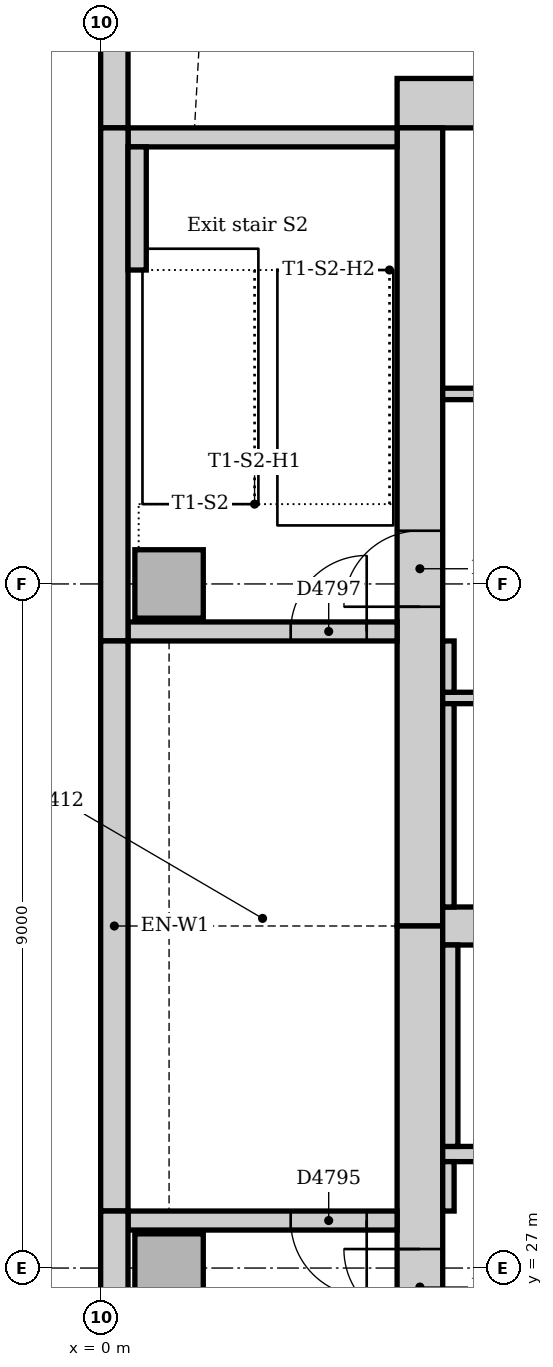
"""IFC4 building model, lengths in metres.
Left out: names, types, materials, properties, quantities, classifications, styles, units other than length and angle.
Written with IfcOpenShell. Run it as: python <this file> out.ifc"""

import sys

from ifc_helpers import new_model, si_unit, direction, frame, frame_2d, origin, origin_2d, place, context, subcontext, project, spatial, rectangle, extrude, element, fill, save


model = new_model("IFC4")
c1 = context("Model", 3, precision=1e-05, world=origin(), true_north=direction((0.0, 1.0)))
c2 = subcontext(c1, "Body", "Model", "MODEL_VIEW")
j1 = project(units=[si_unit("LENGTHUNIT", "METRE"), si_unit("PLANEANGLEUNIT", "RADIAN")], contexts=[c1])
p1 = place(None, origin())
s1 = spatial("IfcSite", under=j1, at=p1, CompositionType="ELEMENT")
p2 = place(p1, origin())
s2 = spatial("IfcBuilding", under=s1, at=p2, CompositionType="ELEMENT")
p3 = place(p2, frame((0.0, 0.0, 185.0)))
s3 = spatial("IfcBuildingStorey", under=s2, at=p3, CompositionType="ELEMENT", Elevation=185.0)
p4 = place(p3, frame((23.15, 42.325, 0.0), z_axis=(0.0, 0.0, 1.0), x_axis=(-1.0, 0.0, 0.0)))
e1 = element("IfcWall", 1, at=p4, inside=s3, PredefinedType="SOLIDWALL", context=c2, shape_type="SweptSolid", body=[
    extrude(rectangle(XDim=19.25, YDim=0.65, at=frame_2d((9.625, 0.0))), origin(), (0.0, 0.0, 1.0), 4.0),
])
p5 = place(p3, frame((4.2, 42.0, 0.0), z_axis=(0.0, 0.0, 1.0), x_axis=(0.0, -1.0, 0.0)))
e2 = element("IfcWall", 2, at=p5, inside=s3, PredefinedType="SOLIDWALL", context=c2, shape_type="SweptSolid", body=[
    extrude(rectangle(XDim=10.5, YDim=0.6, at=frame_2d((5.25, 0.0))), origin(), (0.0, 0.0, 1.0), 4.0),
])
p6 = place(p5, frame((5.3, 0.0, 0.0)))
e3 = element("IfcOpeningElement", 3, at=p6, cuts=e2, PredefinedType="OPENING", context=c2, shape_type="SweptSolid", body=[
    extrude(rectangle(XDim=1.0, YDim=2.1, at=frame_2d((0.5, 1.05))), frame((0.0, 0.31, 0.0), z_axis=(0.0, -1.0, 0.0), x_axis=(1.0, 0.0, 0.0)), (0.0, 0.0, 1.0), 0.62),
])
p7 = place(p3, frame((4.2, 31.5, 0.0), z_axis=(0.0, 0.0, 1.0), x_axis=(0.0, -1.0, 0.0)))
e4 = element("IfcWall", 4, at=p7, inside=s3, PredefinedType="SOLIDWALL", context=c2, shape_type="SweptSolid", body=[
    extrude(rectangle(XDim=10.5, YDim=0.6, at=frame_2d((5.25, 0.0))), origin(), (0.0, 0.0, 1.0), 4.0),
])
p8 = place(p7, frame((4.25, 0.0, 0.0)))
e5 = element("IfcOpeningElement", 5, at=p8, cuts=e4, PredefinedType="OPENING", context=c2, shape_type="SweptSolid", body=[
    extrude(rectangle(XDim=1.0, YDim=2.1, at=frame_2d((0.5, 1.05))), frame((0.0, 0.31, 0.0), z_axis=(0.0, -1.0, 0.0), x_axis=(1.0, 0.0, 0.0)), (0.0, 0.0, 1.0), 0.62),
])
p9 = place(p3, frame((4.5, 31.5, 0.0), z_axis=(0.0, 0.0, 1.0), x_axis=(1.0, 0.0, 0.0)))
e6 = element("IfcWall", 6, at=p9, inside=s3, PredefinedType="SOLIDWALL", context=c2, shape_type="SweptSolid", body=[
    extrude(rectangle(XDim=18.0, YDim=0.5, at=frame_2d((9.0, 0.0))), origin(), (0.0, 0.0, 1.0), 4.0),
])
p10 = place(p3, frame((3.9, 27.625, 0.0), z_axis=(0.0, 0.0, 1.0), x_axis=(-1.0, 0.0, 0.0)))
e7 = element("IfcWall", 7, at=p10, inside=s3, PredefinedType="SOLIDWALL", context=c2, shape_type="SweptSolid", body=[
    extrude(rectangle(XDim=3.54, YDim=0.25, at=frame_2d((1.77, 0.0))), origin(), (0.0, 0.0, 1.0), 4.0),
])
p11 = place(p10, frame((0.4, 0.0, 0.0)))
e8 = element("IfcOpeningElement", 8, at=p11, cuts=e7, PredefinedType="OPENING", context=c2, shape_type="SweptSolid", body=[
    extrude(rectangle(XDim=1.0, YDim=2.1, at=frame_2d((0.5, 1.05))), frame((0.0, 0.135, 0.0), z_axis=(0.0, -1.0, 0.0), x_axis=(1.0, 0.0, 0.0)), (0.0, 0.0, 1.0), 0.27),
])
p12 = place(p3, frame((0.36, 35.375, 0.0), z_axis=(0.0, 0.0, 1.0), x_axis=(1.0, 0.0, 0.0)))
e9 = element("IfcWall", 9, at=p12, inside=s3, PredefinedType="SOLIDWALL", context=c2, shape_type="SweptSolid", body=[
    extrude(rectangle(XDim=3.54, YDim=0.25, at=frame_2d((1.77, 0.0))), origin(), (0.0, 0.0, 1.0), 4.0),
])
p13 = place(p12, frame((2.14, 0.0, 0.0)))
e10 = element("IfcOpeningElement", 10, at=p13, cuts=e9, PredefinedType="OPENING", context=c2, shape_type="SweptSolid", body=[
    extrude(rectangle(XDim=1.0, YDim=2.1, at=frame_2d((0.5, 1.05))), frame((0.0, 0.135, 0.0), z_axis=(0.0, -1.0, 0.0), x_axis=(1.0, 0.0, 0.0)), (0.0, 0.0, 1.0), 0.27),
])
p14 = place(p3, frame((3.9, 41.875, 0.0), z_axis=(0.0, 0.0, 1.0), x_axis=(-1.0, 0.0, 0.0)))
e11 = element("IfcWall", 11, at=p14, inside=s3, PredefinedType="SOLIDWALL", context=c2, shape_type="SweptSolid", body=[
    extrude(rectangle(XDim=3.54, YDim=0.25, at=frame_2d((1.77, 0.0))), origin(), (0.0, 0.0, 1.0), 4.0),
])
for number, where, z_axis, x_axis in (
    (12, (0.9, 27.0, 0.0), (0.0, 0.0, 1.0), (1.0, 0.0, 0.0)),
    (13, (0.9, 36.0, 0.0), (0.0, 0.0, 1.0), (1.0, 0.0, 0.0)),
):
    element("IfcColumn", number, at=place(p3, frame(where, z_axis=z_axis, x_axis=x_axis)), inside=s3, PredefinedType="COLUMN", context=c2, shape_type="SweptSolid", body=[
        extrude(rectangle(XDim=0.9, YDim=0.9, at=origin_2d()), origin(), (0.0, 0.0, 1.0), 4.0),
    ])
p15 = place(p3, frame((0.18, 49.757, 0.0), z_axis=(0.0, 0.0, 1.0), x_axis=(0.0, -1.0, 0.0)))
e14 = element("IfcWall", 14, at=p15, inside=s3, PredefinedType="STANDARD", context=c2, shape_type="SweptSolid", body=[
    extrude(rectangle(XDim=7.757, YDim=0.36, at=frame_2d((3.879, 0.0))), origin(), (0.0, 0.0, 1.0), 3.85),
])
p16 = place(p15, frame((3.107, 0.0, 0.9)))
e15 = element("IfcOpeningElement", 15, at=p16, cuts=e14, PredefinedType="OPENING", context=c2, shape_type="SweptSolid", body=[
    extrude(rectangle(XDim=3.3, YDim=1.6, at=frame_2d((1.65, 0.8))), frame((0.0, 0.19, 0.0), z_axis=(0.0, -1.0, 0.0), x_axis=(1.0, 0.0, 0.0)), (0.0, 0.0, 1.0), 0.38),
])
p17 = place(p3, frame((0.18, 42.0, 0.0), z_axis=(0.0, 0.0, 1.0), x_axis=(0.0, -1.0, 0.0)))
e16 = element("IfcWall", 16, at=p17, inside=s3, PredefinedType="STANDARD", context=c2, shape_type="SweptSolid", body=[
    extrude(rectangle(XDim=6.75, YDim=0.36, at=frame_2d((3.375, 0.0))), origin(), (0.0, 0.0, 1.0), 3.85),
])
p18 = place(p3, frame((0.18, 35.25, 0.0), z_axis=(0.0, 0.0, 1.0), x_axis=(0.0, -1.0, 0.0)))
e17 = element("IfcWall", 17, at=p18, inside=s3, PredefinedType="STANDARD", context=c2, shape_type="SweptSolid", body=[
    extrude(rectangle(XDim=7.5, YDim=0.36, at=frame_2d((3.75, 0.0))), origin(), (0.0, 0.0, 1.0), 3.85),
])
p19 = place(p3, frame((0.18, 27.75, 0.0), z_axis=(0.0, 0.0, 1.0), x_axis=(0.0, -1.0, 0.0)))
e18 = element("IfcWall", 18, at=p19, inside=s3, PredefinedType="STANDARD", context=c2, shape_type="SweptSolid", body=[
    extrude(rectangle(XDim=6.75, YDim=0.36, at=frame_2d((3.375, 0.0))), origin(), (0.0, 0.0, 1.0), 3.85),
])
p20 = place(p3, frame((0.48, 40.13, 0.0), z_axis=(0.0, 0.0, 1.0), x_axis=(0.0, 1.0, 0.0)))
e19 = element("IfcWall", 19, at=p20, inside=s3, PredefinedType="STANDARD", context=c2, shape_type="SweptSolid", body=[
    extrude(rectangle(XDim=1.62, YDim=0.24, at=frame_2d((0.81, 0.0))), origin(), (0.0, 0.0, 1.0), 4.0),
])
p21 = place(p3, frame((4.5, 28.5, 0.0), z_axis=(0.0, 0.0, 1.0), x_axis=(1.0, 0.0, 0.0)))
e20 = element("IfcWall", 20, at=p21, inside=s3, PredefinedType="PARTITIONING", context=c2, shape_type="SweptSolid", body=[
    extrude(rectangle(XDim=18.0, YDim=0.2, at=frame_2d((9.0, 0.0))), origin(), (0.0, 0.0, 1.0), 3.85),
])
p22 = place(p21, frame((0.95, 0.0, 0.0)))
e21 = element("IfcOpeningElement", 21, at=p22, cuts=e20, PredefinedType="OPENING", context=c2, shape_type="SweptSolid", body=[
    extrude(rectangle(XDim=1.1, YDim=2.1, at=frame_2d((0.55, 1.05))), frame((0.0, 0.11, 0.0), z_axis=(0.0, -1.0, 0.0), x_axis=(1.0, 0.0, 0.0)), (0.0, 0.0, 1.0), 0.22),
])
p23 = place(p21, frame((3.95, 0.0, 0.0)))
e22 = element("IfcOpeningElement", 22, at=p23, cuts=e20, PredefinedType="OPENING", context=c2, shape_type="SweptSolid", body=[
    extrude(rectangle(XDim=1.1, YDim=2.1, at=frame_2d((0.55, 1.05))), frame((0.0, 0.11, 0.0), z_axis=(0.0, -1.0, 0.0), x_axis=(1.0, 0.0, 0.0)), (0.0, 0.0, 1.0), 0.22),
])
p24 = place(p21, frame((6.95, 0.0, 0.0)))
e23 = element("IfcOpeningElement", 23, at=p24, cuts=e20, PredefinedType="OPENING", context=c2, shape_type="SweptSolid", body=[
    extrude(rectangle(XDim=1.1, YDim=2.1, at=frame_2d((0.55, 1.05))), frame((0.0, 0.11, 0.0), z_axis=(0.0, -1.0, 0.0), x_axis=(1.0, 0.0, 0.0)), (0.0, 0.0, 1.0), 0.22),
])
p25 = place(p21, frame((9.95, 0.0, 0.0)))
e24 = element("IfcOpeningElement", 24, at=p25, cuts=e20, PredefinedType="OPENING", context=c2, shape_type="SweptSolid", body=[
    extrude(rectangle(XDim=1.1, YDim=2.1, at=frame_2d((0.55, 1.05))), frame((0.0, 0.11, 0.0), z_axis=(0.0, -1.0, 0.0), x_axis=(1.0, 0.0, 0.0)), (0.0, 0.0, 1.0), 0.22),
])
p26 = place(p21, frame((12.95, 0.0, 0.0)))
e25 = element("IfcOpeningElement", 25, at=p26, cuts=e20, PredefinedType="OPENING", context=c2, shape_type="SweptSolid", body=[
    extrude(rectangle(XDim=1.1, YDim=2.1, at=frame_2d((0.55, 1.05))), frame((0.0, 0.11, 0.0), z_axis=(0.0, -1.0, 0.0), x_axis=(1.0, 0.0, 0.0)), (0.0, 0.0, 1.0), 0.22),
])
p27 = place(p21, frame((15.95, 0.0, 0.0)))
e26 = element("IfcOpeningElement", 26, at=p27, cuts=e20, PredefinedType="OPENING", context=c2, shape_type="SweptSolid", body=[
    extrude(rectangle(XDim=1.1, YDim=2.1, at=frame_2d((0.55, 1.05))), frame((0.0, 0.11, 0.0), z_axis=(0.0, -1.0, 0.0), x_axis=(1.0, 0.0, 0.0)), (0.0, 0.0, 1.0), 0.22),
])
p28 = place(p3, frame((4.6, 28.6, 0.0), z_axis=(0.0, 0.0, 1.0), x_axis=(0.0, 1.0, 0.0)))
e27 = element("IfcWall", 27, at=p28, inside=s3, PredefinedType="PARTITIONING", context=c2, shape_type="SweptSolid", body=[
    extrude(rectangle(XDim=2.65, YDim=0.2, at=frame_2d((1.325, 0.0))), origin(), (0.0, 0.0, 1.0), 3.85),
])
p29 = place(p3, frame((4.5, 38.5, 0.0), z_axis=(0.0, 0.0, 1.0), x_axis=(1.0, 0.0, 0.0)))
e28 = element("IfcWall", 28, at=p29, inside=s3, PredefinedType="PARTITIONING", context=c2, shape_type="SweptSolid", body=[
    extrude(rectangle(XDim=11.9, YDim=0.15, at=frame_2d((5.95, 0.0))), origin(), (0.0, 0.0, 1.0), 3.85),
])
p30 = place(p29, frame((1.1, 0.0, 0.0)))
e29 = element("IfcOpeningElement", 29, at=p30, cuts=e28, PredefinedType="OPENING", context=c2, shape_type="SweptSolid", body=[
    extrude(rectangle(XDim=0.9, YDim=2.1, at=frame_2d((0.45, 1.05))), frame((0.0, 0.085, 0.0), z_axis=(0.0, -1.0, 0.0), x_axis=(1.0, 0.0, 0.0)), (0.0, 0.0, 1.0), 0.17),
])
p31 = place(p29, frame((4.05, 0.0, 0.0)))
e30 = element("IfcOpeningElement", 30, at=p31, cuts=e28, PredefinedType="OPENING", context=c2, shape_type="SweptSolid", body=[
    extrude(rectangle(XDim=0.9, YDim=2.1, at=frame_2d((0.45, 1.05))), frame((0.0, 0.085, 0.0), z_axis=(0.0, -1.0, 0.0), x_axis=(1.0, 0.0, 0.0)), (0.0, 0.0, 1.0), 0.17),
])
p32 = place(p29, frame((7.05, 0.0, 0.0)))
e31 = element("IfcOpeningElement", 31, at=p32, cuts=e28, PredefinedType="OPENING", context=c2, shape_type="SweptSolid", body=[
    extrude(rectangle(XDim=0.9, YDim=2.1, at=frame_2d((0.45, 1.05))), frame((0.0, 0.085, 0.0), z_axis=(0.0, -1.0, 0.0), x_axis=(1.0, 0.0, 0.0)), (0.0, 0.0, 1.0), 0.17),
])
p33 = place(p29, frame((9.95, 0.0, 0.0)))
e32 = element("IfcOpeningElement", 32, at=p33, cuts=e28, PredefinedType="OPENING", context=c2, shape_type="SweptSolid", body=[
    extrude(rectangle(XDim=0.8, YDim=2.1, at=frame_2d((0.4, 1.05))), frame((0.0, 0.085, 0.0), z_axis=(0.0, -1.0, 0.0), x_axis=(1.0, 0.0, 0.0)), (0.0, 0.0, 1.0), 0.17),
])
p34 = place(p3, frame((4.5, 34.5, 0.0), z_axis=(0.0, 0.0, 1.0), x_axis=(1.0, 0.0, 0.0)))
e33 = element("IfcWall", 33, at=p34, inside=s3, PredefinedType="PARTITIONING", context=c2, shape_type="SweptSolid", body=[
    extrude(rectangle(XDim=5.9, YDim=0.15, at=frame_2d((2.95, 0.0))), origin(), (0.0, 0.0, 1.0), 3.85),
])
p35 = place(p34, frame((2.5, 0.0, 0.0)))
e34 = element("IfcOpeningElement", 34, at=p35, cuts=e33, PredefinedType="OPENING", context=c2, shape_type="SweptSolid", body=[
    extrude(rectangle(XDim=0.9, YDim=2.1, at=frame_2d((0.45, 1.05))), frame((0.0, 0.085, 0.0), z_axis=(0.0, -1.0, 0.0), x_axis=(1.0, 0.0, 0.0)), (0.0, 0.0, 1.0), 0.17),
])
p36 = place(p3, frame((4.575, 34.575, 0.0), z_axis=(0.0, 0.0, 1.0), x_axis=(0.0, 1.0, 0.0)))
e35 = element("IfcWall", 35, at=p36, inside=s3, PredefinedType="PARTITIONING", context=c2, shape_type="SweptSolid", body=[
    extrude(rectangle(XDim=0.675, YDim=0.15, at=frame_2d((0.338, 0.0))), origin(), (0.0, 0.0, 1.0), 3.85),
])
p37 = place(p3, frame((4.575, 31.75, 0.0), z_axis=(0.0, 0.0, 1.0), x_axis=(0.0, 1.0, 0.0)))
e36 = element("IfcWall", 36, at=p37, inside=s3, PredefinedType="PARTITIONING", context=c2, shape_type="SweptSolid", body=[
    extrude(rectangle(XDim=2.675, YDim=0.15, at=frame_2d((1.337, 0.0))), origin(), (0.0, 0.0, 1.0), 3.85),
])
p38 = place(p3, frame((4.575, 27.75, 0.0), z_axis=(0.0, 0.0, 1.0), x_axis=(0.0, 1.0, 0.0)))
e37 = element("IfcWall", 37, at=p38, inside=s3, PredefinedType="PARTITIONING", context=c2, shape_type="SweptSolid", body=[
    extrude(rectangle(XDim=0.65, YDim=0.15, at=frame_2d((0.325, 0.0))), origin(), (0.0, 0.0, 1.0), 3.85),
])
p39 = place(p8, frame((1.0, 0.0, 0.0), z_axis=(0.0, 0.0, 1.0), x_axis=(-1.0, 0.0, 0.0)))
e38 = element("IfcDoor", 38, at=p39, inside=s3, OperationType="SINGLE_SWING_RIGHT", PredefinedType="DOOR", context=c2, shape_type="SweptSolid", body=[
    extrude(rectangle(XDim=1.0, YDim=2.1, at=frame_2d((0.5, 1.05))), frame((0.0, 0.025, 0.0), z_axis=(0.0, -1.0, 0.0), x_axis=(1.0, 0.0, 0.0)), (0.0, 0.0, 1.0), 0.05),
])
fill(e5, e38)
p40 = place(p11, origin())
e39 = element("IfcDoor", 39, at=p40, inside=s3, OperationType="SINGLE_SWING_LEFT", PredefinedType="DOOR", context=c2, shape_type="SweptSolid", body=[
    extrude(rectangle(XDim=1.0, YDim=2.1, at=frame_2d((0.5, 1.05))), frame((0.0, 0.025, 0.0), z_axis=(0.0, -1.0, 0.0), x_axis=(1.0, 0.0, 0.0)), (0.0, 0.0, 1.0), 0.05),
])
fill(e8, e39)
p41 = place(p6, frame((1.0, 0.0, 0.0), z_axis=(0.0, 0.0, 1.0), x_axis=(-1.0, 0.0, 0.0)))
e40 = element("IfcDoor", 40, at=p41, inside=s3, OperationType="SINGLE_SWING_LEFT", PredefinedType="DOOR", context=c2, shape_type="SweptSolid", body=[
    extrude(rectangle(XDim=1.0, YDim=2.1, at=frame_2d((0.5, 1.05))), frame((0.0, 0.025, 0.0), z_axis=(0.0, -1.0, 0.0), x_axis=(1.0, 0.0, 0.0)), (0.0, 0.0, 1.0), 0.05),
])
fill(e3, e40)
p42 = place(p13, origin())
e41 = element("IfcDoor", 41, at=p42, inside=s3, OperationType="SINGLE_SWING_RIGHT", PredefinedType="DOOR", context=c2, shape_type="SweptSolid", body=[
    extrude(rectangle(XDim=1.0, YDim=2.1, at=frame_2d((0.5, 1.05))), frame((0.0, 0.025, 0.0), z_axis=(0.0, -1.0, 0.0), x_axis=(1.0, 0.0, 0.0)), (0.0, 0.0, 1.0), 0.05),
])
fill(e10, e41)
save(model, sys.argv[1])
